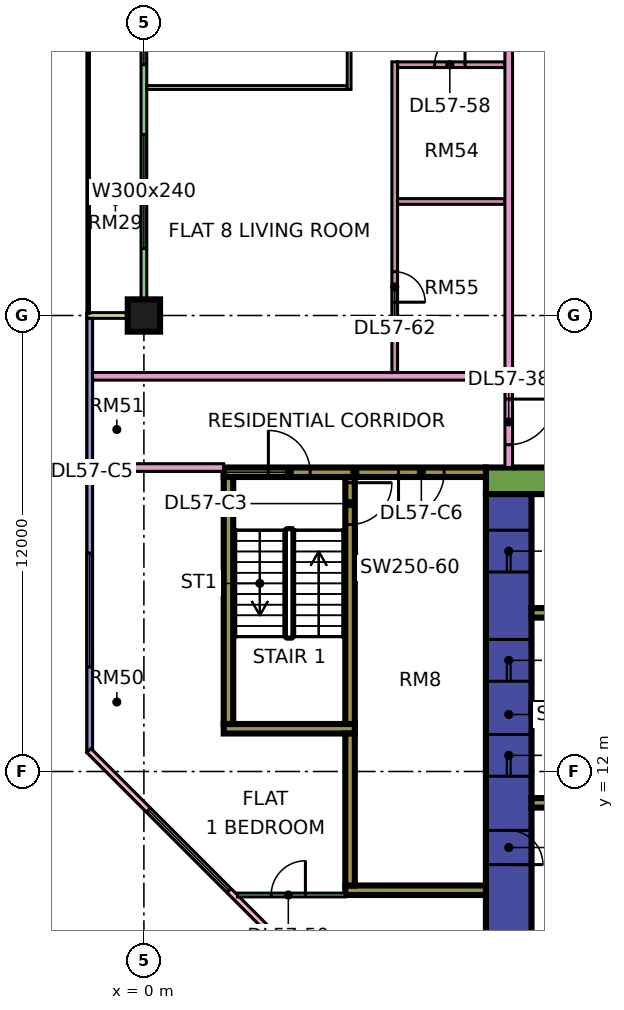
"""IFC4 building model, lengths in metres.
Left out: names, types, materials, properties, quantities, classifications, styles, units other than length and angle.
Written with IfcOpenShell. Run it as: python <this file> out.ifc"""

import sys

from ifc_helpers import new_model, si_unit, direction, frame, frame_2d, origin, origin_2d, place, context, subcontext, project, spatial, rectangle, extrude, element, fill, save


model = new_model("IFC4")
c1 = context("Model", 3, precision=1e-05, world=origin(), true_north=direction((0.0, 1.0)))
c2 = subcontext(c1, "Body", "Model", "MODEL_VIEW")
j1 = project(units=[si_unit("LENGTHUNIT", "METRE"), si_unit("PLANEANGLEUNIT", "RADIAN")], contexts=[c1])
p1 = place(None, origin())
s1 = spatial("IfcSite", under=j1, at=p1, CompositionType="ELEMENT")
p2 = place(p1, origin())
s2 = spatial("IfcBuilding", under=s1, at=p2, CompositionType="ELEMENT")
p3 = place(p2, frame((0.0, 0.0, 241.65)))
s3 = spatial("IfcBuildingStorey", under=s2, at=p3, CompositionType="ELEMENT", Elevation=241.65)
p4 = place(p3, frame((0.0, 24.0, 0.0), z_axis=(0.0, 0.0, 1.0), x_axis=(1.0, 0.0, 0.0)))
e1 = element("IfcColumn", 1, at=p4, inside=s3, PredefinedType="COLUMN", context=c2, shape_type="SweptSolid", body=[
    extrude(rectangle(XDim=0.85, YDim=0.85, at=origin_2d()), origin(), (0.0, 0.0, 1.0), 3.75),
])
p5 = place(p3, frame((9.0, 19.65, 0.0), z_axis=(0.0, 0.0, 1.0), x_axis=(1.0, 0.0, 0.0)))
e2 = element("IfcWall", 2, at=p5, inside=s3, PredefinedType="SHEAR", context=c2, shape_type="SweptSolid", body=[
    extrude(rectangle(XDim=25.0, YDim=0.7, at=frame_2d((12.5, 0.0))), origin(), (0.0, 0.0, 1.0), 3.75),
])
p6 = place(p5, frame((19.1, 0.0, 0.0)))
e3 = element("IfcOpeningElement", 3, at=p6, cuts=e2, PredefinedType="OPENING", context=c2, shape_type="SweptSolid", body=[
    extrude(rectangle(XDim=1.8, YDim=2.4, at=frame_2d((0.9, 1.2))), frame((0.0, 0.36, 0.0), z_axis=(0.0, -1.0, 0.0), x_axis=(1.0, 0.0, 0.0)), (0.0, 0.0, 1.0), 0.72),
])
p7 = place(p3, frame((9.6, 7.7, 0.0), z_axis=(0.0, 0.0, 1.0), x_axis=(0.0, 1.0, 0.0)))
e4 = element("IfcWall", 4, at=p7, inside=s3, PredefinedType="SHEAR", context=c2, shape_type="SweptSolid", body=[
    extrude(rectangle(XDim=11.6, YDim=1.2, at=frame_2d((5.8, 0.0))), origin(), (0.0, 0.0, 1.0), 3.75),
])
p8 = place(p7, frame((4.175, 0.0, 0.0)))
e5 = element("IfcOpeningElement", 5, at=p8, cuts=e4, PredefinedType="OPENING", context=c2, shape_type="SweptSolid", body=[
    extrude(rectangle(XDim=1.1, YDim=2.2, at=frame_2d((0.55, 1.1))), frame((0.0, 0.61, 0.0), z_axis=(0.0, -1.0, 0.0), x_axis=(1.0, 0.0, 0.0)), (0.0, 0.0, 1.0), 1.22),
])
p9 = place(p7, frame((6.675, 0.0, 0.0)))
e6 = element("IfcOpeningElement", 6, at=p9, cuts=e4, PredefinedType="OPENING", context=c2, shape_type="SweptSolid", body=[
    extrude(rectangle(XDim=1.1, YDim=2.2, at=frame_2d((0.55, 1.1))), frame((0.0, 0.61, 0.0), z_axis=(0.0, -1.0, 0.0), x_axis=(1.0, 0.0, 0.0)), (0.0, 0.0, 1.0), 1.22),
])
p10 = place(p7, frame((9.55, 0.0, 0.0)))
e7 = element("IfcOpeningElement", 7, at=p10, cuts=e4, PredefinedType="OPENING", context=c2, shape_type="SweptSolid", body=[
    extrude(rectangle(XDim=1.1, YDim=2.2, at=frame_2d((0.55, 1.1))), frame((0.0, 0.61, 0.0), z_axis=(0.0, -1.0, 0.0), x_axis=(1.0, 0.0, 0.0)), (0.0, 0.0, 1.0), 1.22),
])
p11 = place(p7, frame((1.85, 0.0, 0.0)))
e8 = element("IfcOpeningElement", 8, at=p11, cuts=e4, PredefinedType="OPENING", context=c2, shape_type="SweptSolid", body=[
    extrude(rectangle(XDim=0.9, YDim=2.1, at=frame_2d((0.45, 1.05))), frame((0.0, 0.61, 0.0), z_axis=(0.0, -1.0, 0.0), x_axis=(1.0, 0.0, 0.0)), (0.0, 0.0, 1.0), 1.22),
])
for number, where, z_axis, x_axis in (
    (9, (10.2, 11.175, 0.0), (0.0, 0.0, 1.0), (1.0, 0.0, 0.0)),
    (10, (10.2, 13.675, 0.0), (0.0, 0.0, 1.0), (1.0, 0.0, 0.0)),
    (11, (10.2, 16.175, 0.0), (0.0, 0.0, 1.0), (1.0, 0.0, 0.0)),
):
    element("IfcWall", number, at=place(p3, frame(where, z_axis=z_axis, x_axis=x_axis)), inside=s3, PredefinedType="SHEAR", context=c2, shape_type="SweptSolid", body=[
        extrude(rectangle(XDim=3.0, YDim=0.25, at=frame_2d((1.5, 0.0))), origin(), (0.0, 0.0, 1.0), 3.75),
    ])
p12 = place(p3, frame((2.1, 19.875, 0.0), z_axis=(0.0, 0.0, 1.0), x_axis=(1.0, 0.0, 0.0)))
e12 = element("IfcWall", 12, at=p12, inside=s3, PredefinedType="SHEAR", context=c2, shape_type="SweptSolid", body=[
    extrude(rectangle(XDim=6.9, YDim=0.25, at=frame_2d((3.45, 0.0))), origin(), (0.0, 0.0, 1.0), 3.75),
])
p13 = place(p12, frame((1.175, 0.0, 0.0)))
e13 = element("IfcOpeningElement", 13, at=p13, cuts=e12, PredefinedType="OPENING", context=c2, shape_type="SweptSolid", body=[
    extrude(rectangle(XDim=1.1, YDim=2.2, at=frame_2d((0.55, 1.1))), frame((0.0, 0.135, 0.0), z_axis=(0.0, -1.0, 0.0), x_axis=(1.0, 0.0, 0.0)), (0.0, 0.0, 1.0), 0.27),
])
p14 = place(p12, frame((4.6, 0.0, 0.0)))
e14 = element("IfcOpeningElement", 14, at=p14, cuts=e12, PredefinedType="OPENING", context=c2, shape_type="SweptSolid", body=[
    extrude(rectangle(XDim=1.2, YDim=2.2, at=frame_2d((0.6, 1.1))), frame((0.0, 0.135, 0.0), z_axis=(0.0, -1.0, 0.0), x_axis=(1.0, 0.0, 0.0)), (0.0, 0.0, 1.0), 0.27),
])
p15 = place(p3, frame((2.1, 13.125, 0.0), z_axis=(0.0, 0.0, 1.0), x_axis=(1.0, 0.0, 0.0)))
e15 = element("IfcWall", 15, at=p15, inside=s3, PredefinedType="SHEAR", context=c2, shape_type="SweptSolid", body=[
    extrude(rectangle(XDim=3.45, YDim=0.25, at=frame_2d((1.725, 0.0))), origin(), (0.0, 0.0, 1.0), 3.75),
])
p16 = place(p3, frame((2.225, 13.25, 0.0), z_axis=(0.0, 0.0, 1.0), x_axis=(0.0, 1.0, 0.0)))
e16 = element("IfcWall", 16, at=p16, inside=s3, PredefinedType="SHEAR", context=c2, shape_type="SweptSolid", body=[
    extrude(rectangle(XDim=6.5, YDim=0.25, at=frame_2d((3.25, 0.0))), origin(), (0.0, 0.0, 1.0), 3.75),
])
p17 = place(p3, frame((5.425, 13.25, 0.0), z_axis=(0.0, 0.0, 1.0), x_axis=(0.0, 1.0, 0.0)))
e17 = element("IfcWall", 17, at=p17, inside=s3, PredefinedType="SHEAR", context=c2, shape_type="SweptSolid", body=[
    extrude(rectangle(XDim=6.5, YDim=0.25, at=frame_2d((3.25, 0.0))), origin(), (0.0, 0.0, 1.0), 3.75),
])
p18 = place(p17, frame((5.25, 0.0, 0.0)))
e18 = element("IfcOpeningElement", 18, at=p18, cuts=e17, PredefinedType="OPENING", context=c2, shape_type="SweptSolid", body=[
    extrude(rectangle(XDim=1.1, YDim=2.2, at=frame_2d((0.55, 1.1))), frame((0.0, 0.135, 0.0), z_axis=(0.0, -1.0, 0.0), x_axis=(1.0, 0.0, 0.0)), (0.0, 0.0, 1.0), 0.27),
])
p19 = place(p3, frame((5.3, 8.875, 0.0), z_axis=(0.0, 0.0, 1.0), x_axis=(1.0, 0.0, 0.0)))
e19 = element("IfcWall", 19, at=p19, inside=s3, PredefinedType="SHEAR", context=c2, shape_type="SweptSolid", body=[
    extrude(rectangle(XDim=3.7, YDim=0.25, at=frame_2d((1.85, 0.0))), origin(), (0.0, 0.0, 1.0), 3.75),
])
p20 = place(p3, frame((5.425, 9.0, 0.0), z_axis=(0.0, 0.0, 1.0), x_axis=(0.0, 1.0, 0.0)))
e20 = element("IfcWall", 20, at=p20, inside=s3, PredefinedType="SHEAR", context=c2, shape_type="SweptSolid", body=[
    extrude(rectangle(XDim=4.0, YDim=0.25, at=frame_2d((2.0, 0.0))), origin(), (0.0, 0.0, 1.0), 3.75),
])
p21 = place(p3, frame((0.0, 35.925, 0.0), z_axis=(0.0, 0.0, 1.0), x_axis=(0.0, -1.0, 0.0)))
e21 = element("IfcWall", 21, at=p21, inside=s3, PredefinedType="SOLIDWALL", context=c2, shape_type="SweptSolid", body=[
    extrude(rectangle(XDim=11.85, YDim=0.15, at=frame_2d((5.925, 0.0))), origin(), (0.0, 0.0, 1.0), 3.35),
])
p22 = place(p21, frame((1.087, 0.0, 0.0)))
e22 = element("IfcOpeningElement", 22, at=p22, cuts=e21, PredefinedType="OPENING", context=c2, shape_type="SweptSolid", body=[
    extrude(rectangle(XDim=1.2, YDim=2.4, at=frame_2d((0.6, 1.2))), frame((0.0, 0.085, 0.0), z_axis=(0.0, -1.0, 0.0), x_axis=(1.0, 0.0, 0.0)), (0.0, 0.0, 1.0), 0.17),
])
p23 = place(p21, frame((3.525, 0.0, 0.45)))
e23 = element("IfcOpeningElement", 23, at=p23, cuts=e21, PredefinedType="OPENING", context=c2, shape_type="SweptSolid", body=[
    extrude(rectangle(XDim=1.8, YDim=2.4, at=frame_2d((0.9, 1.2))), frame((0.0, 0.085, 0.0), z_axis=(0.0, -1.0, 0.0), x_axis=(1.0, 0.0, 0.0)), (0.0, 0.0, 1.0), 0.17),
])
p24 = place(p21, frame((7.163, 0.0, 0.45)))
e24 = element("IfcOpeningElement", 24, at=p24, cuts=e21, PredefinedType="OPENING", context=c2, shape_type="SweptSolid", body=[
    extrude(rectangle(XDim=3.0, YDim=2.4, at=frame_2d((1.5, 1.2))), frame((0.0, 0.085, 0.0), z_axis=(0.0, -1.0, 0.0), x_axis=(1.0, 0.0, 0.0)), (0.0, 0.0, 1.0), 0.17),
])
p25 = place(p3, frame((-1.5, 24.0, 0.0), z_axis=(0.0, 0.0, 1.0), x_axis=(1.0, 0.0, 0.0)))
e25 = element("IfcWall", 25, at=p25, inside=s3, PredefinedType="SOLIDWALL", context=c2, shape_type="SweptSolid", body=[
    extrude(rectangle(XDim=1.5, YDim=0.15, at=frame_2d((0.75, 0.0))), origin(), (0.0, 0.0, 1.0), 3.35),
])
p26 = place(p3, frame((-1.425, 23.925, 0.0), z_axis=(0.0, 0.0, 1.0), x_axis=(0.0, -1.0, 0.0)))
e26 = element("IfcWall", 26, at=p26, inside=s3, PredefinedType="SOLIDWALL", context=c2, shape_type="SweptSolid", body=[
    extrude(rectangle(XDim=11.425, YDim=0.15, at=frame_2d((5.712, 0.0))), origin(), (0.0, 0.0, 1.0), 3.35),
])
p27 = place(p26, frame((6.175, 0.0, 0.45)))
e27 = element("IfcOpeningElement", 27, at=p27, cuts=e26, PredefinedType="OPENING", context=c2, shape_type="SweptSolid", body=[
    extrude(rectangle(XDim=3.0, YDim=2.4, at=frame_2d((1.5, 1.2))), frame((0.0, 0.085, 0.0), z_axis=(0.0, -1.0, 0.0), x_axis=(1.0, 0.0, 0.0)), (0.0, 0.0, 1.0), 0.17),
])
p28 = place(p3, frame((-1.447, 12.553, 0.0), z_axis=(0.0, 0.0, 1.0), x_axis=(0.707106781187, -0.707106781187, 0.0)))
e28 = element("IfcWall", 28, at=p28, inside=s3, PredefinedType="SOLIDWALL", context=c2, shape_type="SweptSolid", body=[
    extrude(rectangle(XDim=19.799, YDim=0.15, at=frame_2d((9.899, 0.0))), origin(), (0.0, 0.0, 1.0), 3.35),
])
p29 = place(p28, frame((2.212, 0.0, 0.45)))
e29 = element("IfcOpeningElement", 29, at=p29, cuts=e28, PredefinedType="OPENING", context=c2, shape_type="SweptSolid", body=[
    extrude(rectangle(XDim=3.0, YDim=2.4, at=frame_2d((1.5, 1.2))), frame((0.0, 0.085, 0.0), z_axis=(0.0, -1.0, 0.0), x_axis=(1.0, 0.0, 0.0)), (0.0, 0.0, 1.0), 0.17),
])
p30 = place(p28, frame((10.216, 0.0, 0.45)))
e30 = element("IfcOpeningElement", 30, at=p30, cuts=e28, PredefinedType="OPENING", context=c2, shape_type="SweptSolid", body=[
    extrude(rectangle(XDim=3.0, YDim=2.4, at=frame_2d((1.5, 1.2))), frame((0.0, 0.085, 0.0), z_axis=(0.0, -1.0, 0.0), x_axis=(1.0, 0.0, 0.0)), (0.0, 0.0, 1.0), 0.17),
])
p31 = place(p3, frame((-1.35, 20.0, 0.0), z_axis=(0.0, 0.0, 1.0), x_axis=(1.0, 0.0, 0.0)))
e31 = element("IfcWall", 31, at=p31, inside=s3, PredefinedType="PARTITIONING", context=c2, shape_type="SweptSolid", body=[
    extrude(rectangle(XDim=3.45, YDim=0.2, at=frame_2d((1.725, 0.0))), origin(), (0.0, 0.0, 1.0), 3.35),
])
p32 = place(p3, frame((-1.35, 22.4, 0.0), z_axis=(0.0, 0.0, 1.0), x_axis=(1.0, 0.0, 0.0)))
e32 = element("IfcWall", 32, at=p32, inside=s3, PredefinedType="PARTITIONING", context=c2, shape_type="SweptSolid", body=[
    extrude(rectangle(XDim=10.85, YDim=0.2, at=frame_2d((5.425, 0.0))), origin(), (0.0, 0.0, 1.0), 3.35),
])
p33 = place(p3, frame((0.074, 30.0, 0.0), z_axis=(0.0, 0.0, 1.0), x_axis=(1.0, 0.0, 0.0)))
e33 = element("IfcWall", 33, at=p33, inside=s3, PredefinedType="PARTITIONING", context=c2, shape_type="SweptSolid", body=[
    extrude(rectangle(XDim=5.276, YDim=0.1, at=frame_2d((2.638, 0.0))), origin(), (0.0, 0.0, 1.0), 3.35),
])
p34 = place(p3, frame((2.461, 8.75, 0.0), z_axis=(0.0, 0.0, 1.0), x_axis=(1.0, 0.0, 0.0)))
e34 = element("IfcWall", 34, at=p34, inside=s3, PredefinedType="PARTITIONING", context=c2, shape_type="SweptSolid", body=[
    extrude(rectangle(XDim=2.839, YDim=0.1, at=frame_2d((1.419, 0.0))), origin(), (0.0, 0.0, 1.0), 3.35),
])
p35 = place(p34, frame((0.889, 0.0, 0.0)))
e35 = element("IfcOpeningElement", 35, at=p35, cuts=e34, PredefinedType="OPENING", context=c2, shape_type="SweptSolid", body=[
    extrude(rectangle(XDim=0.9, YDim=2.1, at=frame_2d((0.45, 1.05))), frame((0.0, 0.06, 0.0), z_axis=(0.0, -1.0, 0.0), x_axis=(1.0, 0.0, 0.0)), (0.0, 0.0, 1.0), 0.12),
])
p36 = place(p3, frame((5.4, 29.95, 0.0), z_axis=(0.0, 0.0, 1.0), x_axis=(0.0, 1.0, 0.0)))
e36 = element("IfcWall", 36, at=p36, inside=s3, PredefinedType="PARTITIONING", context=c2, shape_type="SweptSolid", body=[
    extrude(rectangle(XDim=5.95, YDim=0.1, at=frame_2d((2.975, 0.0))), origin(), (0.0, 0.0, 1.0), 3.35),
])
p37 = place(p36, frame((1.1, 0.0, 0.0)))
e37 = element("IfcOpeningElement", 37, at=p37, cuts=e36, PredefinedType="OPENING", context=c2, shape_type="SweptSolid", body=[
    extrude(rectangle(XDim=0.9, YDim=2.1, at=frame_2d((0.45, 1.05))), frame((0.0, 0.06, 0.0), z_axis=(0.0, -1.0, 0.0), x_axis=(1.0, 0.0, 0.0)), (0.0, 0.0, 1.0), 0.12),
])
p38 = place(p36, frame((4.1, 0.0, 0.0)))
e38 = element("IfcOpeningElement", 38, at=p38, cuts=e36, PredefinedType="OPENING", context=c2, shape_type="SweptSolid", body=[
    extrude(rectangle(XDim=0.9, YDim=2.1, at=frame_2d((0.45, 1.05))), frame((0.0, 0.06, 0.0), z_axis=(0.0, -1.0, 0.0), x_axis=(1.0, 0.0, 0.0)), (0.0, 0.0, 1.0), 0.12),
])
p39 = place(p3, frame((6.6, 22.5, 0.0), z_axis=(0.0, 0.0, 1.0), x_axis=(0.0, 1.0, 0.0)))
e39 = element("IfcWall", 39, at=p39, inside=s3, PredefinedType="PARTITIONING", context=c2, shape_type="SweptSolid", body=[
    extrude(rectangle(XDim=8.175, YDim=0.15, at=frame_2d((4.087, 0.0))), origin(), (0.0, 0.0, 1.0), 3.35),
])
p40 = place(p39, frame((1.85, 0.0, 0.0)))
e40 = element("IfcOpeningElement", 40, at=p40, cuts=e39, PredefinedType="OPENING", context=c2, shape_type="SweptSolid", body=[
    extrude(rectangle(XDim=0.8, YDim=2.1, at=frame_2d((0.4, 1.05))), frame((0.0, 0.085, 0.0), z_axis=(0.0, -1.0, 0.0), x_axis=(1.0, 0.0, 0.0)), (0.0, 0.0, 1.0), 0.17),
])
p41 = place(p3, frame((6.675, 27.0, 0.0), z_axis=(0.0, 0.0, 1.0), x_axis=(1.0, 0.0, 0.0)))
e41 = element("IfcWall", 41, at=p41, inside=s3, PredefinedType="PARTITIONING", context=c2, shape_type="SweptSolid", body=[
    extrude(rectangle(XDim=2.825, YDim=0.15, at=frame_2d((1.413, 0.0))), origin(), (0.0, 0.0, 1.0), 3.35),
])
p42 = place(p3, frame((6.675, 30.6, 0.0), z_axis=(0.0, 0.0, 1.0), x_axis=(1.0, 0.0, 0.0)))
e42 = element("IfcWall", 42, at=p42, inside=s3, PredefinedType="PARTITIONING", context=c2, shape_type="SweptSolid", body=[
    extrude(rectangle(XDim=2.825, YDim=0.15, at=frame_2d((1.413, 0.0))), origin(), (0.0, 0.0, 1.0), 3.35),
])
p43 = place(p42, frame((0.975, 0.0, 0.0)))
e43 = element("IfcOpeningElement", 43, at=p43, cuts=e42, PredefinedType="OPENING", context=c2, shape_type="SweptSolid", body=[
    extrude(rectangle(XDim=0.8, YDim=2.1, at=frame_2d((0.4, 1.05))), frame((0.0, 0.085, 0.0), z_axis=(0.0, -1.0, 0.0), x_axis=(1.0, 0.0, 0.0)), (0.0, 0.0, 1.0), 0.17),
])
p44 = place(p3, frame((9.6, 20.0, 0.0), z_axis=(0.0, 0.0, 1.0), x_axis=(0.0, 1.0, 0.0)))
e44 = element("IfcWall", 44, at=p44, inside=s3, PredefinedType="PARTITIONING", context=c2, shape_type="SweptSolid", body=[
    extrude(rectangle(XDim=42.926, YDim=0.2, at=frame_2d((21.463, 0.0))), origin(), (0.0, 0.0, 1.0), 3.35),
])
p45 = place(p44, frame((28.95, 0.0, 0.0)))
e45 = element("IfcOpeningElement", 45, at=p45, cuts=e44, PredefinedType="OPENING", context=c2, shape_type="SweptSolid", body=[
    extrude(rectangle(XDim=1.0, YDim=2.1, at=frame_2d((0.5, 1.05))), frame((0.0, 0.11, 0.0), z_axis=(0.0, -1.0, 0.0), x_axis=(1.0, 0.0, 0.0)), (0.0, 0.0, 1.0), 0.22),
])
p46 = place(p44, frame((31.95, 0.0, 0.0)))
e46 = element("IfcOpeningElement", 46, at=p46, cuts=e44, PredefinedType="OPENING", context=c2, shape_type="SweptSolid", body=[
    extrude(rectangle(XDim=1.0, YDim=2.1, at=frame_2d((0.5, 1.05))), frame((0.0, 0.11, 0.0), z_axis=(0.0, -1.0, 0.0), x_axis=(1.0, 0.0, 0.0)), (0.0, 0.0, 1.0), 0.22),
])
p47 = place(p44, frame((0.6, 0.0, 0.0)))
e47 = element("IfcOpeningElement", 47, at=p47, cuts=e44, PredefinedType="OPENING", context=c2, shape_type="SweptSolid", body=[
    extrude(rectangle(XDim=1.2, YDim=2.1, at=frame_2d((0.6, 1.05))), frame((0.0, 0.11, 0.0), z_axis=(0.0, -1.0, 0.0), x_axis=(1.0, 0.0, 0.0)), (0.0, 0.0, 1.0), 0.22),
])
p48 = place(p44, frame((11.25, 0.0, 0.0)))
e48 = element("IfcOpeningElement", 48, at=p48, cuts=e44, PredefinedType="OPENING", context=c2, shape_type="SweptSolid", body=[
    extrude(rectangle(XDim=1.0, YDim=2.1, at=frame_2d((0.5, 1.05))), frame((0.0, 0.11, 0.0), z_axis=(0.0, -1.0, 0.0), x_axis=(1.0, 0.0, 0.0)), (0.0, 0.0, 1.0), 0.22),
])
p49 = place(p23, origin())
e49 = element("IfcWindow", 49, at=p49, inside=s3, PartitioningType="SINGLE_PANEL", PredefinedType="WINDOW", context=c2, shape_type="SweptSolid", body=[
    extrude(rectangle(XDim=1.8, YDim=2.4, at=frame_2d((0.9, 1.2))), frame((0.0, 0.03, 0.0), z_axis=(0.0, -1.0, 0.0), x_axis=(1.0, 0.0, 0.0)), (0.0, 0.0, 1.0), 0.06),
])
fill(e23, e49)
p50 = place(p24, origin())
e50 = element("IfcWindow", 50, at=p50, inside=s3, PartitioningType="SINGLE_PANEL", PredefinedType="WINDOW", context=c2, shape_type="SweptSolid", body=[
    extrude(rectangle(XDim=3.0, YDim=2.4, at=frame_2d((1.5, 1.2))), frame((0.0, 0.03, 0.0), z_axis=(0.0, -1.0, 0.0), x_axis=(1.0, 0.0, 0.0)), (0.0, 0.0, 1.0), 0.06),
])
fill(e24, e50)
p51 = place(p27, origin())
e51 = element("IfcWindow", 51, at=p51, inside=s3, PartitioningType="SINGLE_PANEL", PredefinedType="WINDOW", context=c2, shape_type="SweptSolid", body=[
    extrude(rectangle(XDim=3.0, YDim=2.4, at=frame_2d((1.5, 1.2))), frame((0.0, 0.03, 0.0), z_axis=(0.0, -1.0, 0.0), x_axis=(1.0, 0.0, 0.0)), (0.0, 0.0, 1.0), 0.06),
])
fill(e27, e51)
p52 = place(p29, origin())
e52 = element("IfcWindow", 52, at=p52, inside=s3, PartitioningType="SINGLE_PANEL", PredefinedType="WINDOW", context=c2, shape_type="SweptSolid", body=[
    extrude(rectangle(XDim=3.0, YDim=2.4, at=frame_2d((1.5, 1.2))), frame((0.0, 0.03, 0.0), z_axis=(0.0, -1.0, 0.0), x_axis=(1.0, 0.0, 0.0)), (0.0, 0.0, 1.0), 0.06),
])
fill(e29, e52)
p53 = place(p8, origin())
e53 = element("IfcDoor", 53, at=p53, inside=s3, OperationType="DOUBLE_DOOR_SLIDING", PredefinedType="DOOR", context=c2, shape_type="SweptSolid", body=[
    extrude(rectangle(XDim=1.1, YDim=2.2, at=frame_2d((0.55, 1.1))), frame((0.0, 0.025, 0.0), z_axis=(0.0, -1.0, 0.0), x_axis=(1.0, 0.0, 0.0)), (0.0, 0.0, 1.0), 0.05),
])
fill(e5, e53)
p54 = place(p9, origin())
e54 = element("IfcDoor", 54, at=p54, inside=s3, OperationType="DOUBLE_DOOR_SLIDING", PredefinedType="DOOR", context=c2, shape_type="SweptSolid", body=[
    extrude(rectangle(XDim=1.1, YDim=2.2, at=frame_2d((0.55, 1.1))), frame((0.0, 0.025, 0.0), z_axis=(0.0, -1.0, 0.0), x_axis=(1.0, 0.0, 0.0)), (0.0, 0.0, 1.0), 0.05),
])
fill(e6, e54)
p55 = place(p10, origin())
e55 = element("IfcDoor", 55, at=p55, inside=s3, OperationType="DOUBLE_DOOR_SLIDING", PredefinedType="DOOR", context=c2, shape_type="SweptSolid", body=[
    extrude(rectangle(XDim=1.1, YDim=2.2, at=frame_2d((0.55, 1.1))), frame((0.0, 0.025, 0.0), z_axis=(0.0, -1.0, 0.0), x_axis=(1.0, 0.0, 0.0)), (0.0, 0.0, 1.0), 0.05),
])
fill(e7, e55)
p56 = place(p18, origin())
e56 = element("IfcDoor", 56, at=p56, inside=s3, OperationType="SINGLE_SWING_RIGHT", PredefinedType="DOOR", context=c2, shape_type="SweptSolid", body=[
    extrude(rectangle(XDim=1.1, YDim=2.2, at=frame_2d((0.55, 1.1))), frame((0.0, 0.025, 0.0), z_axis=(0.0, -1.0, 0.0), x_axis=(1.0, 0.0, 0.0)), (0.0, 0.0, 1.0), 0.05),
])
fill(e18, e56)
p57 = place(p11, frame((0.9, 0.0, 0.0), z_axis=(0.0, 0.0, 1.0), x_axis=(-1.0, 0.0, 0.0)))
e57 = element("IfcDoor", 57, at=p57, inside=s3, OperationType="SINGLE_SWING_LEFT", PredefinedType="DOOR", context=c2, shape_type="SweptSolid", body=[
    extrude(rectangle(XDim=0.9, YDim=2.1, at=frame_2d((0.45, 1.05))), frame((0.0, 0.025, 0.0), z_axis=(0.0, -1.0, 0.0), x_axis=(1.0, 0.0, 0.0)), (0.0, 0.0, 1.0), 0.05),
])
fill(e8, e57)
p58 = place(p13, origin())
e58 = element("IfcDoor", 58, at=p58, inside=s3, OperationType="SINGLE_SWING_LEFT", PredefinedType="DOOR", context=c2, shape_type="SweptSolid", body=[
    extrude(rectangle(XDim=1.1, YDim=2.2, at=frame_2d((0.55, 1.1))), frame((0.0, 0.025, 0.0), z_axis=(0.0, -1.0, 0.0), x_axis=(1.0, 0.0, 0.0)), (0.0, 0.0, 1.0), 0.05),
])
fill(e13, e58)
p59 = place(p14, frame((1.2, 0.0, 0.0), z_axis=(0.0, 0.0, 1.0), x_axis=(-1.0, 0.0, 0.0)))
e59 = element("IfcDoor", 59, at=p59, inside=s3, OperationType="SINGLE_SWING_LEFT", PredefinedType="DOOR", context=c2, shape_type="SweptSolid", body=[
    extrude(rectangle(XDim=1.2, YDim=2.2, at=frame_2d((0.6, 1.1))), frame((0.0, 0.025, 0.0), z_axis=(0.0, -1.0, 0.0), x_axis=(1.0, 0.0, 0.0)), (0.0, 0.0, 1.0), 0.05),
])
fill(e14, e59)
p60 = place(p47, origin())
e60 = element("IfcDoor", 60, at=p60, inside=s3, OperationType="SINGLE_SWING_RIGHT", PredefinedType="DOOR", context=c2, shape_type="SweptSolid", body=[
    extrude(rectangle(XDim=1.2, YDim=2.1, at=frame_2d((0.6, 1.05))), frame((0.0, 0.025, 0.0), z_axis=(0.0, -1.0, 0.0), x_axis=(1.0, 0.0, 0.0)), (0.0, 0.0, 1.0), 0.05),
])
fill(e47, e60)
p61 = place(p35, frame((0.9, 0.0, 0.0), z_axis=(0.0, 0.0, 1.0), x_axis=(-1.0, 0.0, 0.0)))
e61 = element("IfcDoor", 61, at=p61, inside=s3, OperationType="SINGLE_SWING_RIGHT", PredefinedType="DOOR", context=c2, shape_type="SweptSolid", body=[
    extrude(rectangle(XDim=0.9, YDim=2.1, at=frame_2d((0.45, 1.05))), frame((0.0, 0.025, 0.0), z_axis=(0.0, -1.0, 0.0), x_axis=(1.0, 0.0, 0.0)), (0.0, 0.0, 1.0), 0.05),
])
fill(e35, e61)
p62 = place(p43, frame((0.8, 0.0, 0.0), z_axis=(0.0, 0.0, 1.0), x_axis=(-1.0, 0.0, 0.0)))
e62 = element("IfcDoor", 62, at=p62, inside=s3, OperationType="SINGLE_SWING_RIGHT", PredefinedType="DOOR", context=c2, shape_type="SweptSolid", body=[
    extrude(rectangle(XDim=0.8, YDim=2.1, at=frame_2d((0.4, 1.05))), frame((0.0, 0.025, 0.0), z_axis=(0.0, -1.0, 0.0), x_axis=(1.0, 0.0, 0.0)), (0.0, 0.0, 1.0), 0.05),
])
fill(e43, e62)
p63 = place(p40, frame((0.8, 0.0, 0.0), z_axis=(0.0, 0.0, 1.0), x_axis=(-1.0, 0.0, 0.0)))
e63 = element("IfcDoor", 63, at=p63, inside=s3, OperationType="SINGLE_SWING_LEFT", PredefinedType="DOOR", context=c2, shape_type="SweptSolid", body=[
    extrude(rectangle(XDim=0.8, YDim=2.1, at=frame_2d((0.4, 1.05))), frame((0.0, 0.025, 0.0), z_axis=(0.0, -1.0, 0.0), x_axis=(1.0, 0.0, 0.0)), (0.0, 0.0, 1.0), 0.05),
])
fill(e40, e63)
save(model, sys.argv[1])
